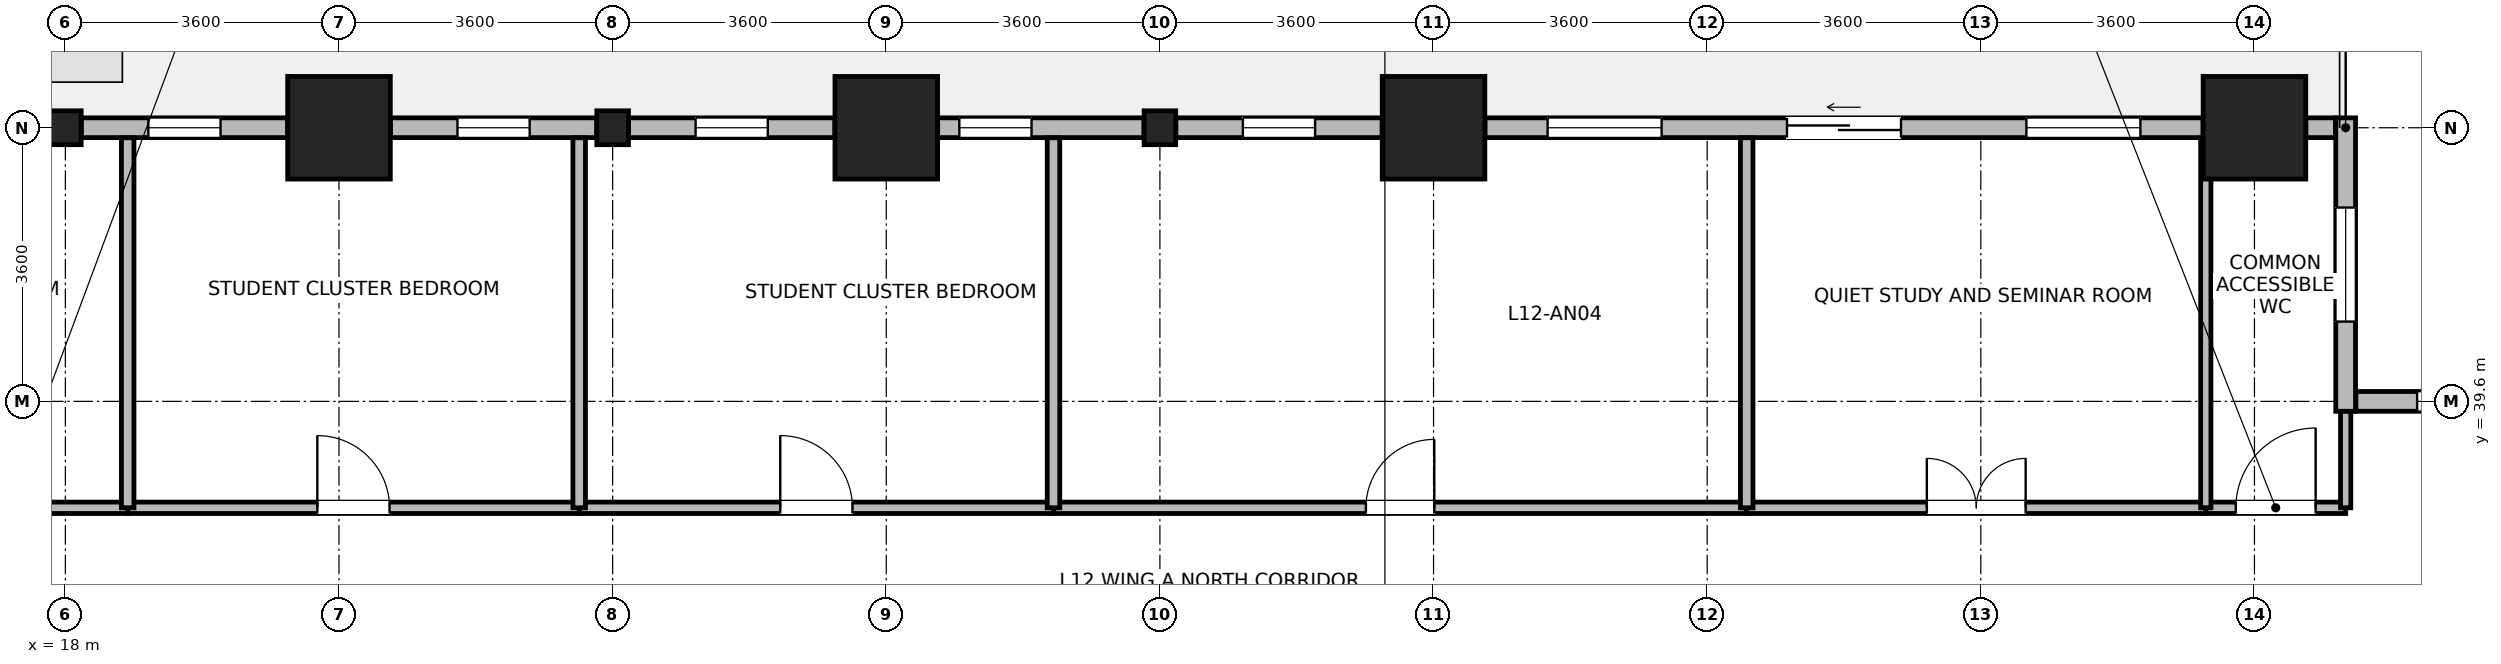
"""IFC4 building model, lengths in metres.
Left out: names, types, materials, properties, quantities, classifications, styles, units other than length and angle.
Written with IfcOpenShell. Run it as: python <this file> out.ifc"""

import sys

from ifc_helpers import new_model, si_unit, direction, frame, frame_2d, origin, origin_2d, place, context, subcontext, project, spatial, rectangle, i_section, extrude, source, transform, mapped, element, fill, save


model = new_model("IFC4")
c1 = context("Model", 3, precision=1e-05, world=origin(), true_north=direction((0.0, 1.0)))
c2 = subcontext(c1, "Body", "Model", "MODEL_VIEW")
j1 = project(units=[si_unit("LENGTHUNIT", "METRE"), si_unit("PLANEANGLEUNIT", "RADIAN")], contexts=[c1])
p1 = place(None, origin())
s1 = spatial("IfcSite", under=j1, at=p1, CompositionType="ELEMENT")
p2 = place(p1, origin())
s2 = spatial("IfcBuilding", under=s1, at=p2, CompositionType="ELEMENT")
p3 = place(p2, frame((0.0, 0.0, 51.2)))
s3 = spatial("IfcBuildingStorey", under=s2, at=p3, CompositionType="ELEMENT", Elevation=51.2)
m1 = source(origin(), c2, "Body", "SweptSolid", [
    extrude(rectangle(XDim=1.35, YDim=1.35, at=origin_2d()), origin(), (0.0, 0.0, 1.0), 3.7),
])
for number, where, z_axis, x_axis in (
    (1, (21.6, 43.2, 0.0), (0.0, 0.0, 1.0), (1.0, 0.0, 0.0)),
    (2, (28.8, 43.2, 0.0), (0.0, 0.0, 1.0), (1.0, 0.0, 0.0)),
    (3, (36.0, 43.2, 0.0), (0.0, 0.0, 1.0), (1.0, 0.0, 0.0)),
    (4, (46.8, 43.2, 0.0), (0.0, 0.0, 1.0), (1.0, 0.0, 0.0)),
):
    element("IfcColumn", number, at=place(p3, frame(where, z_axis=z_axis, x_axis=x_axis)), inside=s3, PredefinedType="COLUMN", context=c2, shape_type="MappedRepresentation", body=[
        mapped(m1, transform((0.0, 0.0, 0.0), x_axis=(1.0, 0.0, 0.0), y_axis=(0.0, 1.0, 0.0), z_axis=(0.0, 0.0, 1.0), scale=1.0)),
    ])
m2 = source(origin(), c2, "Body", "SweptSolid", [
    extrude(i_section(OverallWidth=0.416, OverallDepth=0.446, WebThickness=0.029, FlangeThickness=0.04, FilletRadius=0.015, at=origin_2d()), origin(), (0.0, 0.0, 1.0), 3.7),
])
for number, where, z_axis, x_axis in (
    (5, (18.0, 43.2, 0.0), (0.0, 0.0, 1.0), (1.0, 0.0, 0.0)),
    (6, (25.2, 43.2, 0.0), (0.0, 0.0, 1.0), (1.0, 0.0, 0.0)),
    (7, (32.4, 43.2, 0.0), (0.0, 0.0, 1.0), (1.0, 0.0, 0.0)),
):
    element("IfcColumn", number, at=place(p3, frame(where, z_axis=z_axis, x_axis=x_axis)), inside=s3, PredefinedType="COLUMN", context=c2, shape_type="MappedRepresentation", body=[
        mapped(m2, transform((0.0, 0.0, 0.0), x_axis=(1.0, 0.0, 0.0), y_axis=(0.0, 1.0, 0.0), z_axis=(0.0, 0.0, 1.0), scale=1.0)),
    ])
p4 = place(p3, frame((48.135, 39.6, 0.0), z_axis=(0.0, 0.0, 1.0), x_axis=(1.0, 0.0, 0.0)))
e8 = element("IfcWall", 8, at=p4, inside=s3, PredefinedType="STANDARD", context=c2, shape_type="SweptSolid", body=[
    extrude(rectangle(XDim=9.33, YDim=0.26, at=frame_2d((4.665, 0.0))), origin(), (0.0, 0.0, 1.0), 3.43),
])
p5 = place(p4, frame((0.805, 0.0, 0.85)))
e9 = element("IfcOpeningElement", 9, at=p5, cuts=e8, PredefinedType="OPENING", context=c2, shape_type="SweptSolid", body=[
    extrude(rectangle(XDim=1.5, YDim=1.85, at=frame_2d((0.75, 0.925))), frame((0.0, 0.14, 0.0), z_axis=(0.0, -1.0, 0.0), x_axis=(1.0, 0.0, 0.0)), (0.0, 0.0, 1.0), 0.28),
])
p6 = place(p4, frame((3.915, 0.0, 0.85)))
e10 = element("IfcOpeningElement", 10, at=p6, cuts=e8, PredefinedType="OPENING", context=c2, shape_type="SweptSolid", body=[
    extrude(rectangle(XDim=1.5, YDim=1.85, at=frame_2d((0.75, 0.925))), frame((0.0, 0.14, 0.0), z_axis=(0.0, -1.0, 0.0), x_axis=(1.0, 0.0, 0.0)), (0.0, 0.0, 1.0), 0.28),
])
p7 = place(p4, frame((7.025, 0.0, 0.85)))
e11 = element("IfcOpeningElement", 11, at=p7, cuts=e8, PredefinedType="OPENING", context=c2, shape_type="SweptSolid", body=[
    extrude(rectangle(XDim=1.5, YDim=1.85, at=frame_2d((0.75, 0.925))), frame((0.0, 0.14, 0.0), z_axis=(0.0, -1.0, 0.0), x_axis=(1.0, 0.0, 0.0)), (0.0, 0.0, 1.0), 0.28),
])
p8 = place(p3, frame((48.0, 43.33, 0.0), z_axis=(0.0, 0.0, 1.0), x_axis=(0.0, -1.0, 0.0)))
e12 = element("IfcWall", 12, at=p8, inside=s3, PredefinedType="STANDARD", context=c2, shape_type="SweptSolid", body=[
    extrude(rectangle(XDim=3.86, YDim=0.26, at=frame_2d((1.93, 0.0))), origin(), (0.0, 0.0, 1.0), 3.43),
])
p9 = place(p8, frame((1.18, 0.0, 0.85)))
e13 = element("IfcOpeningElement", 13, at=p9, cuts=e12, PredefinedType="OPENING", context=c2, shape_type="SweptSolid", body=[
    extrude(rectangle(XDim=1.5, YDim=1.85, at=frame_2d((0.75, 0.925))), frame((0.0, 0.14, 0.0), z_axis=(0.0, -1.0, 0.0), x_axis=(1.0, 0.0, 0.0)), (0.0, 0.0, 1.0), 0.28),
])
p10 = place(p3, frame((47.476, 43.2, 0.0), z_axis=(0.0, 0.0, 1.0), x_axis=(1.0, 0.0, 0.0)))
e14 = element("IfcWall", 14, at=p10, inside=s3, PredefinedType="STANDARD", context=c2, shape_type="SweptSolid", body=[
    extrude(rectangle(XDim=0.389, YDim=0.26, at=frame_2d((0.194, 0.0))), origin(), (0.0, 0.0, 1.0), 3.43),
])
p11 = place(p3, frame((36.676, 43.2, 0.0), z_axis=(0.0, 0.0, 1.0), x_axis=(1.0, 0.0, 0.0)))
e15 = element("IfcWall", 15, at=p11, inside=s3, PredefinedType="STANDARD", context=c2, shape_type="SweptSolid", body=[
    extrude(rectangle(XDim=9.448, YDim=0.26, at=frame_2d((4.724, 0.0))), origin(), (0.0, 0.0, 1.0), 2.93),
])
p12 = place(p11, frame((3.974, 0.0, 0.0)))
e16 = element("IfcOpeningElement", 16, at=p12, cuts=e15, PredefinedType="OPENING", context=c2, shape_type="SweptSolid", body=[
    extrude(rectangle(XDim=1.5, YDim=2.15, at=frame_2d((0.75, 1.075))), frame((0.0, 0.14, 0.0), z_axis=(0.0, -1.0, 0.0), x_axis=(1.0, 0.0, 0.0)), (0.0, 0.0, 1.0), 0.28),
])
p13 = place(p11, frame((0.825, 0.0, 0.85)))
e17 = element("IfcOpeningElement", 17, at=p13, cuts=e15, PredefinedType="OPENING", context=c2, shape_type="SweptSolid", body=[
    extrude(rectangle(XDim=1.5, YDim=1.85, at=frame_2d((0.75, 0.925))), frame((0.0, 0.14, 0.0), z_axis=(0.0, -1.0, 0.0), x_axis=(1.0, 0.0, 0.0)), (0.0, 0.0, 1.0), 0.28),
])
p14 = place(p11, frame((7.123, 0.0, 0.85)))
e18 = element("IfcOpeningElement", 18, at=p14, cuts=e15, PredefinedType="OPENING", context=c2, shape_type="SweptSolid", body=[
    extrude(rectangle(XDim=1.5, YDim=1.85, at=frame_2d((0.75, 0.925))), frame((0.0, 0.14, 0.0), z_axis=(0.0, -1.0, 0.0), x_axis=(1.0, 0.0, 0.0)), (0.0, 0.0, 1.0), 0.28),
])
p15 = place(p3, frame((32.609, 43.2, 0.0), z_axis=(0.0, 0.0, 1.0), x_axis=(1.0, 0.0, 0.0)))
e19 = element("IfcWall", 19, at=p15, inside=s3, PredefinedType="STANDARD", context=c2, shape_type="SweptSolid", body=[
    extrude(rectangle(XDim=2.715, YDim=0.26, at=frame_2d((1.357, 0.0))), origin(), (0.0, 0.0, 1.0), 2.93),
])
p16 = place(p15, frame((0.883, 0.0, 0.85)))
e20 = element("IfcOpeningElement", 20, at=p16, cuts=e19, PredefinedType="OPENING", context=c2, shape_type="SweptSolid", body=[
    extrude(rectangle(XDim=0.95, YDim=1.75, at=frame_2d((0.475, 0.875))), frame((0.0, 0.14, 0.0), z_axis=(0.0, -1.0, 0.0), x_axis=(1.0, 0.0, 0.0)), (0.0, 0.0, 1.0), 0.28),
])
p17 = place(p3, frame((29.476, 43.2, 0.0), z_axis=(0.0, 0.0, 1.0), x_axis=(1.0, 0.0, 0.0)))
e21 = element("IfcWall", 21, at=p17, inside=s3, PredefinedType="STANDARD", context=c2, shape_type="SweptSolid", body=[
    extrude(rectangle(XDim=2.715, YDim=0.26, at=frame_2d((1.357, 0.0))), origin(), (0.0, 0.0, 1.0), 2.93),
])
p18 = place(p17, frame((0.285, 0.0, 0.85)))
e22 = element("IfcOpeningElement", 22, at=p18, cuts=e21, PredefinedType="OPENING", context=c2, shape_type="SweptSolid", body=[
    extrude(rectangle(XDim=0.95, YDim=1.75, at=frame_2d((0.475, 0.875))), frame((0.0, 0.14, 0.0), z_axis=(0.0, -1.0, 0.0), x_axis=(1.0, 0.0, 0.0)), (0.0, 0.0, 1.0), 0.28),
])
p19 = place(p3, frame((25.409, 43.2, 0.0), z_axis=(0.0, 0.0, 1.0), x_axis=(1.0, 0.0, 0.0)))
e23 = element("IfcWall", 23, at=p19, inside=s3, PredefinedType="STANDARD", context=c2, shape_type="SweptSolid", body=[
    extrude(rectangle(XDim=2.715, YDim=0.26, at=frame_2d((1.357, 0.0))), origin(), (0.0, 0.0, 1.0), 2.93),
])
p20 = place(p19, frame((0.883, 0.0, 0.85)))
e24 = element("IfcOpeningElement", 24, at=p20, cuts=e23, PredefinedType="OPENING", context=c2, shape_type="SweptSolid", body=[
    extrude(rectangle(XDim=0.95, YDim=1.75, at=frame_2d((0.475, 0.875))), frame((0.0, 0.14, 0.0), z_axis=(0.0, -1.0, 0.0), x_axis=(1.0, 0.0, 0.0)), (0.0, 0.0, 1.0), 0.28),
])
p21 = place(p3, frame((22.276, 43.2, 0.0), z_axis=(0.0, 0.0, 1.0), x_axis=(1.0, 0.0, 0.0)))
e25 = element("IfcWall", 25, at=p21, inside=s3, PredefinedType="STANDARD", context=c2, shape_type="SweptSolid", body=[
    extrude(rectangle(XDim=2.715, YDim=0.26, at=frame_2d((1.357, 0.0))), origin(), (0.0, 0.0, 1.0), 2.93),
])
p22 = place(p21, frame((0.883, 0.0, 0.85)))
e26 = element("IfcOpeningElement", 26, at=p22, cuts=e25, PredefinedType="OPENING", context=c2, shape_type="SweptSolid", body=[
    extrude(rectangle(XDim=0.95, YDim=1.75, at=frame_2d((0.475, 0.875))), frame((0.0, 0.14, 0.0), z_axis=(0.0, -1.0, 0.0), x_axis=(1.0, 0.0, 0.0)), (0.0, 0.0, 1.0), 0.28),
])
p23 = place(p3, frame((18.209, 43.2, 0.0), z_axis=(0.0, 0.0, 1.0), x_axis=(1.0, 0.0, 0.0)))
e27 = element("IfcWall", 27, at=p23, inside=s3, PredefinedType="STANDARD", context=c2, shape_type="SweptSolid", body=[
    extrude(rectangle(XDim=2.715, YDim=0.26, at=frame_2d((1.357, 0.0))), origin(), (0.0, 0.0, 1.0), 2.93),
])
p24 = place(p23, frame((0.883, 0.0, 0.85)))
e28 = element("IfcOpeningElement", 28, at=p24, cuts=e27, PredefinedType="OPENING", context=c2, shape_type="SweptSolid", body=[
    extrude(rectangle(XDim=0.95, YDim=1.75, at=frame_2d((0.475, 0.875))), frame((0.0, 0.14, 0.0), z_axis=(0.0, -1.0, 0.0), x_axis=(1.0, 0.0, 0.0)), (0.0, 0.0, 1.0), 0.28),
])
p25 = place(p3, frame((31.0, 38.2, 0.0), z_axis=(0.0, 0.0, 1.0), x_axis=(1.0, 0.0, 0.0)))
e29 = element("IfcWall", 29, at=p25, inside=s3, PredefinedType="PARTITIONING", context=c2, shape_type="SweptSolid", body=[
    extrude(rectangle(XDim=9.12, YDim=0.15, at=frame_2d((4.56, 0.0))), origin(), (0.0, 0.0, 1.0), 3.43),
])
p26 = place(p25, frame((4.11, 0.0, 0.0)))
e30 = element("IfcOpeningElement", 30, at=p26, cuts=e29, PredefinedType="OPENING", context=c2, shape_type="SweptSolid", body=[
    extrude(rectangle(XDim=0.9, YDim=2.08, at=frame_2d((0.45, 1.04))), frame((0.0, 0.085, 0.0), z_axis=(0.0, -1.0, 0.0), x_axis=(1.0, 0.0, 0.0)), (0.0, 0.0, 1.0), 0.17),
])
p27 = place(p3, frame((24.76, 38.2, 0.0), z_axis=(0.0, 0.0, 1.0), x_axis=(1.0, 0.0, 0.0)))
e31 = element("IfcWall", 31, at=p27, inside=s3, PredefinedType="PARTITIONING", context=c2, shape_type="SweptSolid", body=[
    extrude(rectangle(XDim=6.24, YDim=0.15, at=frame_2d((3.12, 0.0))), origin(), (0.0, 0.0, 1.0), 3.43),
])
p28 = place(p27, frame((2.645, 0.0, 0.0)))
e32 = element("IfcOpeningElement", 32, at=p28, cuts=e31, PredefinedType="OPENING", context=c2, shape_type="SweptSolid", body=[
    extrude(rectangle(XDim=0.95, YDim=2.1, at=frame_2d((0.475, 1.05))), frame((0.0, 0.085, 0.0), z_axis=(0.0, -1.0, 0.0), x_axis=(1.0, 0.0, 0.0)), (0.0, 0.0, 1.0), 0.17),
])
p29 = place(p3, frame((40.12, 38.2, 0.0), z_axis=(0.0, 0.0, 1.0), x_axis=(1.0, 0.0, 0.0)))
e33 = element("IfcWall", 33, at=p29, inside=s3, PredefinedType="PARTITIONING", context=c2, shape_type="SweptSolid", body=[
    extrude(rectangle(XDim=6.04, YDim=0.15, at=frame_2d((3.02, 0.0))), origin(), (0.0, 0.0, 1.0), 3.43),
])
p30 = place(p29, frame((2.37, 0.0, 0.0)))
e34 = element("IfcOpeningElement", 34, at=p30, cuts=e33, PredefinedType="OPENING", context=c2, shape_type="SweptSolid", body=[
    extrude(rectangle(XDim=1.3, YDim=2.12, at=frame_2d((0.65, 1.06))), frame((0.0, 0.085, 0.0), z_axis=(0.0, -1.0, 0.0), x_axis=(1.0, 0.0, 0.0)), (0.0, 0.0, 1.0), 0.17),
])
p31 = place(p3, frame((18.82, 38.2, 0.0), z_axis=(0.0, 0.0, 1.0), x_axis=(1.0, 0.0, 0.0)))
e35 = element("IfcWall", 35, at=p31, inside=s3, PredefinedType="PARTITIONING", context=c2, shape_type="SweptSolid", body=[
    extrude(rectangle(XDim=5.94, YDim=0.15, at=frame_2d((2.97, 0.0))), origin(), (0.0, 0.0, 1.0), 3.43),
])
p32 = place(p31, frame((2.495, 0.0, 0.0)))
e36 = element("IfcOpeningElement", 36, at=p32, cuts=e35, PredefinedType="OPENING", context=c2, shape_type="SweptSolid", body=[
    extrude(rectangle(XDim=0.95, YDim=2.1, at=frame_2d((0.475, 1.05))), frame((0.0, 0.085, 0.0), z_axis=(0.0, -1.0, 0.0), x_axis=(1.0, 0.0, 0.0)), (0.0, 0.0, 1.0), 0.17),
])
p33 = place(p3, frame((13.2, 38.2, 0.0), z_axis=(0.0, 0.0, 1.0), x_axis=(1.0, 0.0, 0.0)))
e37 = element("IfcWall", 37, at=p33, inside=s3, PredefinedType="PARTITIONING", context=c2, shape_type="SweptSolid", body=[
    extrude(rectangle(XDim=5.62, YDim=0.15, at=frame_2d((2.81, 0.0))), origin(), (0.0, 0.0, 1.0), 3.43),
])
p34 = place(p33, frame((2.335, 0.0, 0.0)))
e38 = element("IfcOpeningElement", 38, at=p34, cuts=e37, PredefinedType="OPENING", context=c2, shape_type="SweptSolid", body=[
    extrude(rectangle(XDim=0.95, YDim=2.1, at=frame_2d((0.475, 1.05))), frame((0.0, 0.085, 0.0), z_axis=(0.0, -1.0, 0.0), x_axis=(1.0, 0.0, 0.0)), (0.0, 0.0, 1.0), 0.17),
])
p35 = place(p3, frame((46.16, 38.2, 0.0), z_axis=(0.0, 0.0, 1.0), x_axis=(1.0, 0.0, 0.0)))
e39 = element("IfcWall", 39, at=p35, inside=s3, PredefinedType="PARTITIONING", context=c2, shape_type="SweptSolid", body=[
    extrude(rectangle(XDim=1.84, YDim=0.15, at=frame_2d((0.92, 0.0))), origin(), (0.0, 0.0, 1.0), 3.43),
])
p36 = place(p35, frame((0.395, 0.0, 0.0)))
e40 = element("IfcOpeningElement", 40, at=p36, cuts=e39, PredefinedType="OPENING", context=c2, shape_type="SweptSolid", body=[
    extrude(rectangle(XDim=1.05, YDim=2.12, at=frame_2d((0.525, 1.06))), frame((0.0, 0.085, 0.0), z_axis=(0.0, -1.0, 0.0), x_axis=(1.0, 0.0, 0.0)), (0.0, 0.0, 1.0), 0.17),
])
for number, where, z_axis, x_axis in (
    (41, (18.82, 38.2, 0.0), (0.0, 0.0, 1.0), (0.0, 1.0, 0.0)),
    (42, (24.76, 38.2, 0.0), (0.0, 0.0, 1.0), (0.0, 1.0, 0.0)),
    (43, (31.0, 38.2, 0.0), (0.0, 0.0, 1.0), (0.0, 1.0, 0.0)),
    (44, (40.12, 38.2, 0.0), (0.0, 0.0, 1.0), (0.0, 1.0, 0.0)),
):
    element("IfcWall", number, at=place(p3, frame(where, z_axis=z_axis, x_axis=x_axis)), inside=s3, PredefinedType="PARTITIONING", context=c2, shape_type="SweptSolid", body=[
        extrude(rectangle(XDim=4.868, YDim=0.165, at=frame_2d((2.434, 0.0))), origin(), (0.0, 0.0, 1.0), 3.43),
    ])
p37 = place(p3, frame((46.16, 38.2, 0.0), z_axis=(0.0, 0.0, 1.0), x_axis=(0.0, 1.0, 0.0)))
e45 = element("IfcWall", 45, at=p37, inside=s3, PredefinedType="PARTITIONING", context=c2, shape_type="SweptSolid", body=[
    extrude(rectangle(XDim=4.868, YDim=0.135, at=frame_2d((2.434, 0.0))), origin(), (0.0, 0.0, 1.0), 3.43),
])
p38 = place(p3, frame((48.0, 38.2, 0.0), z_axis=(0.0, 0.0, 1.0), x_axis=(0.0, 1.0, 0.0)))
e46 = element("IfcWall", 46, at=p38, inside=s3, PredefinedType="PARTITIONING", context=c2, shape_type="SweptSolid", body=[
    extrude(rectangle(XDim=1.268, YDim=0.135, at=frame_2d((0.634, 0.0))), origin(), (0.0, 0.0, 1.0), 3.43),
])
p39 = place(p5, origin())
e47 = element("IfcWindow", 47, at=p39, inside=s3, PartitioningType="SINGLE_PANEL", PredefinedType="WINDOW", context=c2, shape_type="SweptSolid", body=[
    extrude(rectangle(XDim=1.5, YDim=1.85, at=frame_2d((0.75, 0.925))), frame((0.0, 0.03, 0.0), z_axis=(0.0, -1.0, 0.0), x_axis=(1.0, 0.0, 0.0)), (0.0, 0.0, 1.0), 0.06),
])
fill(e9, e47)
p40 = place(p9, origin())
e48 = element("IfcWindow", 48, at=p40, inside=s3, PartitioningType="SINGLE_PANEL", PredefinedType="WINDOW", context=c2, shape_type="SweptSolid", body=[
    extrude(rectangle(XDim=1.5, YDim=1.85, at=frame_2d((0.75, 0.925))), frame((0.0, 0.03, 0.0), z_axis=(0.0, -1.0, 0.0), x_axis=(1.0, 0.0, 0.0)), (0.0, 0.0, 1.0), 0.06),
])
fill(e13, e48)
p41 = place(p12, origin())
e49 = element("IfcDoor", 49, at=p41, inside=s3, OperationType="SLIDING_TO_LEFT", PredefinedType="DOOR", context=c2, shape_type="SweptSolid", body=[
    extrude(rectangle(XDim=1.5, YDim=2.15, at=frame_2d((0.75, 1.075))), frame((0.0, 0.025, 0.0), z_axis=(0.0, -1.0, 0.0), x_axis=(1.0, 0.0, 0.0)), (0.0, 0.0, 1.0), 0.05),
])
fill(e16, e49)
p42 = place(p13, origin())
e50 = element("IfcWindow", 50, at=p42, inside=s3, PartitioningType="SINGLE_PANEL", PredefinedType="WINDOW", context=c2, shape_type="SweptSolid", body=[
    extrude(rectangle(XDim=1.5, YDim=1.85, at=frame_2d((0.75, 0.925))), frame((0.0, 0.03, 0.0), z_axis=(0.0, -1.0, 0.0), x_axis=(1.0, 0.0, 0.0)), (0.0, 0.0, 1.0), 0.06),
])
fill(e17, e50)
p43 = place(p14, origin())
e51 = element("IfcWindow", 51, at=p43, inside=s3, PartitioningType="SINGLE_PANEL", PredefinedType="WINDOW", context=c2, shape_type="SweptSolid", body=[
    extrude(rectangle(XDim=1.5, YDim=1.85, at=frame_2d((0.75, 0.925))), frame((0.0, 0.03, 0.0), z_axis=(0.0, -1.0, 0.0), x_axis=(1.0, 0.0, 0.0)), (0.0, 0.0, 1.0), 0.06),
])
fill(e18, e51)
p44 = place(p16, origin())
e52 = element("IfcWindow", 52, at=p44, inside=s3, PartitioningType="SINGLE_PANEL", PredefinedType="WINDOW", context=c2, shape_type="SweptSolid", body=[
    extrude(rectangle(XDim=0.95, YDim=1.75, at=frame_2d((0.475, 0.875))), frame((0.0, 0.03, 0.0), z_axis=(0.0, -1.0, 0.0), x_axis=(1.0, 0.0, 0.0)), (0.0, 0.0, 1.0), 0.06),
])
fill(e20, e52)
p45 = place(p18, origin())
e53 = element("IfcWindow", 53, at=p45, inside=s3, PartitioningType="SINGLE_PANEL", PredefinedType="WINDOW", context=c2, shape_type="SweptSolid", body=[
    extrude(rectangle(XDim=0.95, YDim=1.75, at=frame_2d((0.475, 0.875))), frame((0.0, 0.03, 0.0), z_axis=(0.0, -1.0, 0.0), x_axis=(1.0, 0.0, 0.0)), (0.0, 0.0, 1.0), 0.06),
])
fill(e22, e53)
p46 = place(p20, origin())
e54 = element("IfcWindow", 54, at=p46, inside=s3, PartitioningType="SINGLE_PANEL", PredefinedType="WINDOW", context=c2, shape_type="SweptSolid", body=[
    extrude(rectangle(XDim=0.95, YDim=1.75, at=frame_2d((0.475, 0.875))), frame((0.0, 0.03, 0.0), z_axis=(0.0, -1.0, 0.0), x_axis=(1.0, 0.0, 0.0)), (0.0, 0.0, 1.0), 0.06),
])
fill(e24, e54)
p47 = place(p22, origin())
e55 = element("IfcWindow", 55, at=p47, inside=s3, PartitioningType="SINGLE_PANEL", PredefinedType="WINDOW", context=c2, shape_type="SweptSolid", body=[
    extrude(rectangle(XDim=0.95, YDim=1.75, at=frame_2d((0.475, 0.875))), frame((0.0, 0.03, 0.0), z_axis=(0.0, -1.0, 0.0), x_axis=(1.0, 0.0, 0.0)), (0.0, 0.0, 1.0), 0.06),
])
fill(e26, e55)
p48 = place(p24, origin())
e56 = element("IfcWindow", 56, at=p48, inside=s3, PartitioningType="SINGLE_PANEL", PredefinedType="WINDOW", context=c2, shape_type="SweptSolid", body=[
    extrude(rectangle(XDim=0.95, YDim=1.75, at=frame_2d((0.475, 0.875))), frame((0.0, 0.03, 0.0), z_axis=(0.0, -1.0, 0.0), x_axis=(1.0, 0.0, 0.0)), (0.0, 0.0, 1.0), 0.06),
])
fill(e28, e56)
p49 = place(p26, origin())
e57 = element("IfcDoor", 57, at=p49, inside=s3, OperationType="SINGLE_SWING_RIGHT", PredefinedType="DOOR", context=c2, shape_type="SweptSolid", body=[
    extrude(rectangle(XDim=0.9, YDim=2.08, at=frame_2d((0.45, 1.04))), frame((0.0, 0.025, 0.0), z_axis=(0.0, -1.0, 0.0), x_axis=(1.0, 0.0, 0.0)), (0.0, 0.0, 1.0), 0.05),
])
fill(e30, e57)
p50 = place(p28, origin())
e58 = element("IfcDoor", 58, at=p50, inside=s3, OperationType="SINGLE_SWING_LEFT", PredefinedType="DOOR", context=c2, shape_type="SweptSolid", body=[
    extrude(rectangle(XDim=0.95, YDim=2.1, at=frame_2d((0.475, 1.05))), frame((0.0, 0.025, 0.0), z_axis=(0.0, -1.0, 0.0), x_axis=(1.0, 0.0, 0.0)), (0.0, 0.0, 1.0), 0.05),
])
fill(e32, e58)
p51 = place(p30, origin())
e59 = element("IfcDoor", 59, at=p51, inside=s3, OperationType="DOUBLE_DOOR_SINGLE_SWING", PredefinedType="DOOR", context=c2, shape_type="SweptSolid", body=[
    extrude(rectangle(XDim=1.3, YDim=2.12, at=frame_2d((0.65, 1.06))), frame((0.0, 0.025, 0.0), z_axis=(0.0, -1.0, 0.0), x_axis=(1.0, 0.0, 0.0)), (0.0, 0.0, 1.0), 0.05),
])
fill(e34, e59)
p52 = place(p32, origin())
e60 = element("IfcDoor", 60, at=p52, inside=s3, OperationType="SINGLE_SWING_LEFT", PredefinedType="DOOR", context=c2, shape_type="SweptSolid", body=[
    extrude(rectangle(XDim=0.95, YDim=2.1, at=frame_2d((0.475, 1.05))), frame((0.0, 0.025, 0.0), z_axis=(0.0, -1.0, 0.0), x_axis=(1.0, 0.0, 0.0)), (0.0, 0.0, 1.0), 0.05),
])
fill(e36, e60)
p53 = place(p36, origin())
e61 = element("IfcDoor", 61, at=p53, inside=s3, OperationType="SINGLE_SWING_RIGHT", PredefinedType="DOOR", context=c2, shape_type="SweptSolid", body=[
    extrude(rectangle(XDim=1.05, YDim=2.12, at=frame_2d((0.525, 1.06))), frame((0.0, 0.025, 0.0), z_axis=(0.0, -1.0, 0.0), x_axis=(1.0, 0.0, 0.0)), (0.0, 0.0, 1.0), 0.05),
])
fill(e40, e61)
save(model, sys.argv[1])
